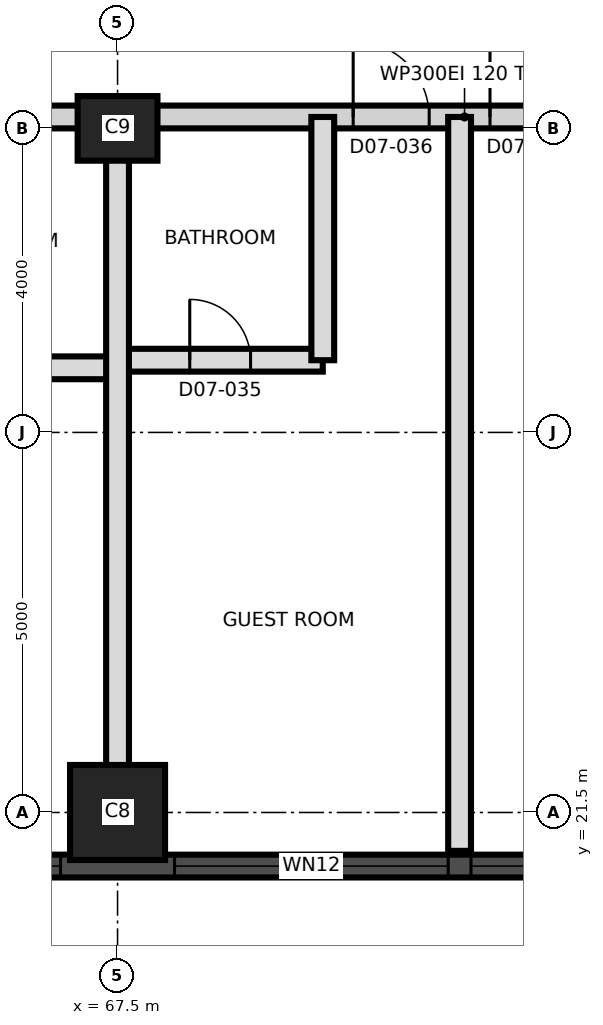
"""IFC4 building model, lengths in metres.
Left out: names, types, materials, properties, quantities, classifications, styles, units other than length and angle.
Written with IfcOpenShell. Run it as: python <this file> out.ifc"""

import sys

from ifc_helpers import new_model, si_unit, direction, frame, frame_2d, origin, origin_2d, place, context, subcontext, project, spatial, rectangle, extrude, element, fill, save


model = new_model("IFC4")
c1 = context("Model", 3, precision=1e-05, world=origin(), true_north=direction((0.0, 1.0)))
c2 = subcontext(c1, "Body", "Model", "MODEL_VIEW")
j1 = project(units=[si_unit("LENGTHUNIT", "METRE"), si_unit("PLANEANGLEUNIT", "RADIAN")], contexts=[c1])
p1 = place(None, origin())
s1 = spatial("IfcSite", under=j1, at=p1, CompositionType="ELEMENT")
p2 = place(p1, origin())
s2 = spatial("IfcBuilding", under=s1, at=p2, CompositionType="ELEMENT")
p3 = place(p2, frame((0.0, 0.0, 94.5)))
s3 = spatial("IfcBuildingStorey", under=s2, at=p3, CompositionType="ELEMENT", Elevation=94.5)
p4 = place(p3, frame((67.5, 21.5, 0.0), z_axis=(0.0, 0.0, 1.0), x_axis=(1.0, 0.0, 0.0)))
e1 = element("IfcColumn", 1, at=p4, inside=s3, PredefinedType="COLUMN", context=c2, shape_type="SweptSolid", body=[
    extrude(rectangle(XDim=1.25, YDim=1.25, at=origin_2d()), origin(), (0.0, 0.0, 1.0), 3.7),
])
p5 = place(p3, frame((67.5, 30.5, 0.0), z_axis=(0.0, 0.0, 1.0), x_axis=(1.0, 0.0, 0.0)))
e2 = element("IfcColumn", 2, at=p5, inside=s3, PredefinedType="COLUMN", context=c2, shape_type="SweptSolid", body=[
    extrude(rectangle(XDim=1.05, YDim=0.85, at=origin_2d()), origin(), (0.0, 0.0, 1.0), 3.7),
])
p6 = place(p3, frame((44.011, 20.795, 0.0), z_axis=(0.0, 0.0, 1.0), x_axis=(1.0, 0.0, 0.0)))
e3 = element("IfcWall", 3, at=p6, inside=s3, PredefinedType="SOLIDWALL", context=c2, shape_type="SweptSolid", body=[
    extrude(rectangle(XDim=43.476, YDim=0.3, at=frame_2d((21.738, 0.0))), origin(), (0.0, 0.0, 1.0), 3.4),
])
p7 = place(p6, frame((1.845, 0.0, 0.3)))
e4 = element("IfcOpeningElement", 4, at=p7, cuts=e3, PredefinedType="OPENING", context=c2, shape_type="SweptSolid", body=[
    extrude(rectangle(XDim=1.8, YDim=2.4, at=frame_2d((0.9, 1.2))), frame((0.0, 0.16, 0.0), z_axis=(0.0, -1.0, 0.0), x_axis=(1.0, 0.0, 0.0)), (0.0, 0.0, 1.0), 0.32),
])
p8 = place(p6, frame((5.639, 0.0, 0.9)))
e5 = element("IfcOpeningElement", 5, at=p8, cuts=e3, PredefinedType="OPENING", context=c2, shape_type="SweptSolid", body=[
    extrude(rectangle(XDim=4.2, YDim=1.5, at=frame_2d((2.1, 0.75))), frame((0.0, 0.16, 0.0), z_axis=(0.0, -1.0, 0.0), x_axis=(1.0, 0.0, 0.0)), (0.0, 0.0, 1.0), 0.32),
])
p9 = place(p6, frame((10.139, 0.0, 0.9)))
e6 = element("IfcOpeningElement", 6, at=p9, cuts=e3, PredefinedType="OPENING", context=c2, shape_type="SweptSolid", body=[
    extrude(rectangle(XDim=4.2, YDim=1.5, at=frame_2d((2.1, 0.75))), frame((0.0, 0.16, 0.0), z_axis=(0.0, -1.0, 0.0), x_axis=(1.0, 0.0, 0.0)), (0.0, 0.0, 1.0), 0.32),
])
p10 = place(p6, frame((14.639, 0.0, 0.9)))
e7 = element("IfcOpeningElement", 7, at=p10, cuts=e3, PredefinedType="OPENING", context=c2, shape_type="SweptSolid", body=[
    extrude(rectangle(XDim=4.2, YDim=1.5, at=frame_2d((2.1, 0.75))), frame((0.0, 0.16, 0.0), z_axis=(0.0, -1.0, 0.0), x_axis=(1.0, 0.0, 0.0)), (0.0, 0.0, 1.0), 0.32),
])
p11 = place(p6, frame((19.139, 0.0, 0.9)))
e8 = element("IfcOpeningElement", 8, at=p11, cuts=e3, PredefinedType="OPENING", context=c2, shape_type="SweptSolid", body=[
    extrude(rectangle(XDim=3.6, YDim=1.5, at=frame_2d((1.8, 0.75))), frame((0.0, 0.16, 0.0), z_axis=(0.0, -1.0, 0.0), x_axis=(1.0, 0.0, 0.0)), (0.0, 0.0, 1.0), 0.32),
])
p12 = place(p6, frame((24.239, 0.0, 0.9)))
e9 = element("IfcOpeningElement", 9, at=p12, cuts=e3, PredefinedType="OPENING", context=c2, shape_type="SweptSolid", body=[
    extrude(rectangle(XDim=3.6, YDim=1.5, at=frame_2d((1.8, 0.75))), frame((0.0, 0.16, 0.0), z_axis=(0.0, -1.0, 0.0), x_axis=(1.0, 0.0, 0.0)), (0.0, 0.0, 1.0), 0.32),
])
p13 = place(p6, frame((28.139, 0.0, 0.9)))
e10 = element("IfcOpeningElement", 10, at=p13, cuts=e3, PredefinedType="OPENING", context=c2, shape_type="SweptSolid", body=[
    extrude(rectangle(XDim=3.6, YDim=1.5, at=frame_2d((1.8, 0.75))), frame((0.0, 0.16, 0.0), z_axis=(0.0, -1.0, 0.0), x_axis=(1.0, 0.0, 0.0)), (0.0, 0.0, 1.0), 0.32),
])
p14 = place(p6, frame((33.239, 0.0, 0.9)))
e11 = element("IfcOpeningElement", 11, at=p14, cuts=e3, PredefinedType="OPENING", context=c2, shape_type="SweptSolid", body=[
    extrude(rectangle(XDim=3.6, YDim=1.5, at=frame_2d((1.8, 0.75))), frame((0.0, 0.16, 0.0), z_axis=(0.0, -1.0, 0.0), x_axis=(1.0, 0.0, 0.0)), (0.0, 0.0, 1.0), 0.32),
])
p15 = place(p6, frame((37.139, 0.0, 0.9)))
e12 = element("IfcOpeningElement", 12, at=p15, cuts=e3, PredefinedType="OPENING", context=c2, shape_type="SweptSolid", body=[
    extrude(rectangle(XDim=3.6, YDim=1.5, at=frame_2d((1.8, 0.75))), frame((0.0, 0.16, 0.0), z_axis=(0.0, -1.0, 0.0), x_axis=(1.0, 0.0, 0.0)), (0.0, 0.0, 1.0), 0.32),
])
p16 = place(p3, frame((64.5, 27.35, 0.0), z_axis=(0.0, 0.0, 1.0), x_axis=(1.0, 0.0, 0.0)))
e13 = element("IfcWall", 13, at=p16, inside=s3, PredefinedType="PARTITIONING", context=c2, shape_type="SweptSolid", body=[
    extrude(rectangle(XDim=3.0, YDim=0.3, at=frame_2d((1.5, 0.0))), origin(), (0.0, 0.0, 1.0), 3.4),
])
p17 = place(p16, frame((1.1, 0.0, 0.0)))
e14 = element("IfcOpeningElement", 14, at=p17, cuts=e13, PredefinedType="OPENING", context=c2, shape_type="SweptSolid", body=[
    extrude(rectangle(XDim=0.8, YDim=2.1, at=frame_2d((0.4, 1.05))), frame((0.0, 0.16, 0.0), z_axis=(0.0, -1.0, 0.0), x_axis=(1.0, 0.0, 0.0)), (0.0, 0.0, 1.0), 0.32),
])
p18 = place(p3, frame((67.5, 27.45, 0.0), z_axis=(0.0, 0.0, 1.0), x_axis=(1.0, 0.0, 0.0)))
e15 = element("IfcWall", 15, at=p18, inside=s3, PredefinedType="PARTITIONING", context=c2, shape_type="SweptSolid", body=[
    extrude(rectangle(XDim=2.7, YDim=0.3, at=frame_2d((1.35, 0.0))), origin(), (0.0, 0.0, 1.0), 3.4),
])
p19 = place(p18, frame((0.95, 0.0, 0.0)))
e16 = element("IfcOpeningElement", 16, at=p19, cuts=e15, PredefinedType="OPENING", context=c2, shape_type="SweptSolid", body=[
    extrude(rectangle(XDim=0.8, YDim=2.1, at=frame_2d((0.4, 1.05))), frame((0.0, 0.16, 0.0), z_axis=(0.0, -1.0, 0.0), x_axis=(1.0, 0.0, 0.0)), (0.0, 0.0, 1.0), 0.32),
])
p20 = place(p3, frame((58.8, 30.65, 0.0), z_axis=(0.0, 0.0, 1.0), x_axis=(1.0, 0.0, 0.0)))
e17 = element("IfcWall", 17, at=p20, inside=s3, PredefinedType="PARTITIONING", context=c2, shape_type="SweptSolid", body=[
    extrude(rectangle(XDim=26.53, YDim=0.3, at=frame_2d((13.265, 0.0))), origin(), (0.0, 0.0, 1.0), 3.4),
])
p21 = place(p20, frame((3.7, 0.0, 0.0)))
e18 = element("IfcOpeningElement", 18, at=p21, cuts=e17, PredefinedType="OPENING", context=c2, shape_type="SweptSolid", body=[
    extrude(rectangle(XDim=1.0, YDim=2.4, at=frame_2d((0.5, 1.2))), frame((0.0, 0.16, 0.0), z_axis=(0.0, -1.0, 0.0), x_axis=(1.0, 0.0, 0.0)), (0.0, 0.0, 1.0), 0.32),
])
p22 = place(p20, frame((11.8, 0.0, 0.0)))
e19 = element("IfcOpeningElement", 19, at=p22, cuts=e17, PredefinedType="OPENING", context=c2, shape_type="SweptSolid", body=[
    extrude(rectangle(XDim=1.0, YDim=2.1, at=frame_2d((0.5, 1.05))), frame((0.0, 0.16, 0.0), z_axis=(0.0, -1.0, 0.0), x_axis=(1.0, 0.0, 0.0)), (0.0, 0.0, 1.0), 0.32),
])
p23 = place(p20, frame((13.6, 0.0, 0.0)))
e20 = element("IfcOpeningElement", 20, at=p23, cuts=e17, PredefinedType="OPENING", context=c2, shape_type="SweptSolid", body=[
    extrude(rectangle(XDim=1.0, YDim=2.1, at=frame_2d((0.5, 1.05))), frame((0.0, 0.16, 0.0), z_axis=(0.0, -1.0, 0.0), x_axis=(1.0, 0.0, 0.0)), (0.0, 0.0, 1.0), 0.32),
])
p24 = place(p20, frame((18.85, 0.0, 0.0)))
e21 = element("IfcOpeningElement", 21, at=p24, cuts=e17, PredefinedType="OPENING", context=c2, shape_type="SweptSolid", body=[
    extrude(rectangle(XDim=1.0, YDim=2.1, at=frame_2d((0.5, 1.05))), frame((0.0, 0.16, 0.0), z_axis=(0.0, -1.0, 0.0), x_axis=(1.0, 0.0, 0.0)), (0.0, 0.0, 1.0), 0.32),
])
p25 = place(p20, frame((24.7, 0.0, 0.0)))
e22 = element("IfcOpeningElement", 22, at=p25, cuts=e17, PredefinedType="OPENING", context=c2, shape_type="SweptSolid", body=[
    extrude(rectangle(XDim=1.0, YDim=2.1, at=frame_2d((0.5, 1.05))), frame((0.0, 0.16, 0.0), z_axis=(0.0, -1.0, 0.0), x_axis=(1.0, 0.0, 0.0)), (0.0, 0.0, 1.0), 0.32),
])
p26 = place(p3, frame((67.5, 20.995, 0.0), z_axis=(0.0, 0.0, 1.0), x_axis=(0.0, 1.0, 0.0)))
e23 = element("IfcWall", 23, at=p26, inside=s3, PredefinedType="PARTITIONING", context=c2, shape_type="SweptSolid", body=[
    extrude(rectangle(XDim=9.655, YDim=0.3, at=frame_2d((4.827, 0.0))), origin(), (0.0, 0.0, 1.0), 3.35),
])
p27 = place(p3, frame((70.2, 27.45, 0.0), z_axis=(0.0, 0.0, 1.0), x_axis=(0.0, 1.0, 0.0)))
e24 = element("IfcWall", 24, at=p27, inside=s3, PredefinedType="PARTITIONING", context=c2, shape_type="SweptSolid", body=[
    extrude(rectangle(XDim=3.2, YDim=0.3, at=frame_2d((1.6, 0.0))), origin(), (0.0, 0.0, 1.0), 3.4),
])
p28 = place(p3, frame((72.0, 20.995, 0.0), z_axis=(0.0, 0.0, 1.0), x_axis=(0.0, 1.0, 0.0)))
e25 = element("IfcWall", 25, at=p28, inside=s3, PredefinedType="PARTITIONING", context=c2, shape_type="SweptSolid", body=[
    extrude(rectangle(XDim=9.655, YDim=0.3, at=frame_2d((4.827, 0.0))), origin(), (0.0, 0.0, 1.0), 3.35),
])
p29 = place(p11, origin())
e26 = element("IfcWindow", 26, at=p29, inside=s3, PartitioningType="SINGLE_PANEL", PredefinedType="WINDOW", context=c2, shape_type="SweptSolid", body=[
    extrude(rectangle(XDim=3.6, YDim=1.5, at=frame_2d((1.8, 0.75))), frame((0.0, 0.03, 0.0), z_axis=(0.0, -1.0, 0.0), x_axis=(1.0, 0.0, 0.0)), (0.0, 0.0, 1.0), 0.06),
])
fill(e8, e26)
p30 = place(p12, origin())
e27 = element("IfcWindow", 27, at=p30, inside=s3, PartitioningType="SINGLE_PANEL", PredefinedType="WINDOW", context=c2, shape_type="SweptSolid", body=[
    extrude(rectangle(XDim=3.6, YDim=1.5, at=frame_2d((1.8, 0.75))), frame((0.0, 0.03, 0.0), z_axis=(0.0, -1.0, 0.0), x_axis=(1.0, 0.0, 0.0)), (0.0, 0.0, 1.0), 0.06),
])
fill(e9, e27)
p31 = place(p13, origin())
e28 = element("IfcWindow", 28, at=p31, inside=s3, PartitioningType="SINGLE_PANEL", PredefinedType="WINDOW", context=c2, shape_type="SweptSolid", body=[
    extrude(rectangle(XDim=3.6, YDim=1.5, at=frame_2d((1.8, 0.75))), frame((0.0, 0.03, 0.0), z_axis=(0.0, -1.0, 0.0), x_axis=(1.0, 0.0, 0.0)), (0.0, 0.0, 1.0), 0.06),
])
fill(e10, e28)
p32 = place(p19, origin())
e29 = element("IfcDoor", 29, at=p32, inside=s3, OperationType="SINGLE_SWING_LEFT", PredefinedType="DOOR", context=c2, shape_type="SweptSolid", body=[
    extrude(rectangle(XDim=0.8, YDim=2.1, at=frame_2d((0.4, 1.05))), frame((0.0, 0.025, 0.0), z_axis=(0.0, -1.0, 0.0), x_axis=(1.0, 0.0, 0.0)), (0.0, 0.0, 1.0), 0.05),
])
fill(e16, e29)
p33 = place(p22, origin())
e30 = element("IfcDoor", 30, at=p33, inside=s3, OperationType="SINGLE_SWING_LEFT", PredefinedType="DOOR", context=c2, shape_type="SweptSolid", body=[
    extrude(rectangle(XDim=1.0, YDim=2.1, at=frame_2d((0.5, 1.05))), frame((0.0, 0.025, 0.0), z_axis=(0.0, -1.0, 0.0), x_axis=(1.0, 0.0, 0.0)), (0.0, 0.0, 1.0), 0.05),
])
fill(e19, e30)
p34 = place(p23, origin())
e31 = element("IfcDoor", 31, at=p34, inside=s3, OperationType="SINGLE_SWING_RIGHT", PredefinedType="DOOR", context=c2, shape_type="SweptSolid", body=[
    extrude(rectangle(XDim=1.0, YDim=2.1, at=frame_2d((0.5, 1.05))), frame((0.0, 0.025, 0.0), z_axis=(0.0, -1.0, 0.0), x_axis=(1.0, 0.0, 0.0)), (0.0, 0.0, 1.0), 0.05),
])
fill(e20, e31)
save(model, sys.argv[1])
